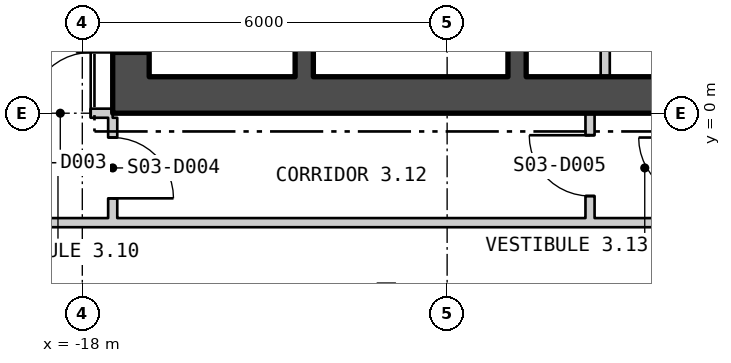
"""IFC4 building model, lengths in metres.
Left out: names, types, materials, properties, quantities, classifications, styles, units other than length and angle.
Written with IfcOpenShell. Run it as: python <this file> out.ifc"""

import sys

from ifc_helpers import new_model, si_unit, direction, frame, frame_2d, origin, origin_2d, place, context, subcontext, project, spatial, polyline, rectangle, i_section, outline, extrude, element, fill, save


model = new_model("IFC4")
c1 = context("Model", 3, precision=1e-05, world=origin(), true_north=direction((0.0, 1.0)))
c2 = subcontext(c1, "Body", "Model", "MODEL_VIEW")
j1 = project(units=[si_unit("LENGTHUNIT", "METRE"), si_unit("PLANEANGLEUNIT", "RADIAN")], contexts=[c1])
p1 = place(None, origin())
s1 = spatial("IfcSite", under=j1, at=p1, CompositionType="ELEMENT")
p2 = place(p1, origin())
s2 = spatial("IfcBuilding", under=s1, at=p2, CompositionType="ELEMENT")
p3 = place(p2, frame((0.0, 0.0, 46.8)))
s3 = spatial("IfcBuildingStorey", under=s2, at=p3, CompositionType="ELEMENT", Elevation=46.8)
p4 = place(p3, frame((-13.0, -3.2, 0.0), z_axis=(0.0, 0.0, 1.0), x_axis=(1.0, 0.0, 0.0)))
e1 = element("IfcColumn", 1, at=p4, inside=s3, PredefinedType="COLUMN", context=c2, shape_type="SweptSolid", body=[
    extrude(i_section(OverallWidth=0.303, OverallDepth=0.814, WebThickness=0.021, FlangeThickness=0.04, at=origin_2d()), origin(), (0.0, 0.0, 1.0), 4.5),
])
p5 = place(p3, frame((-28.445, 10.319, -0.18), z_axis=(0.0, 0.0, 1.0), x_axis=(0.499999764979, -0.866025539474, 0.0)))
e2 = element("IfcWall", 2, at=p5, inside=s3, PredefinedType="SOLIDWALL", context=c2, shape_type="SweptSolid", body=[
    extrude(outline(polyline([(-0.13, -0.225), (45.87, -0.225), (45.61, 0.225), (0.13, 0.225), (-0.13, -0.225)])), origin(), (0.0, 0.0, 1.0), 4.28),
])
p6 = place(p5, frame((1.424, 0.0, 1.08)))
e3 = element("IfcOpeningElement", 3, at=p6, cuts=e2, PredefinedType="OPENING", context=c2, shape_type="SweptSolid", body=[
    extrude(rectangle(XDim=2.4, YDim=2.6, at=frame_2d((1.2, 1.3))), frame((0.0, 0.235, 0.0), z_axis=(0.0, -1.0, 0.0), x_axis=(1.0, 0.0, 0.0)), (0.0, 0.0, 1.0), 0.47),
])
p7 = place(p5, frame((5.893, 0.0, 1.08)))
e4 = element("IfcOpeningElement", 4, at=p7, cuts=e2, PredefinedType="OPENING", context=c2, shape_type="SweptSolid", body=[
    extrude(rectangle(XDim=2.4, YDim=2.6, at=frame_2d((1.2, 1.3))), frame((0.0, 0.235, 0.0), z_axis=(0.0, -1.0, 0.0), x_axis=(1.0, 0.0, 0.0)), (0.0, 0.0, 1.0), 0.47),
])
p8 = place(p5, frame((10.401, 0.0, 1.08)))
e5 = element("IfcOpeningElement", 5, at=p8, cuts=e2, PredefinedType="OPENING", context=c2, shape_type="SweptSolid", body=[
    extrude(rectangle(XDim=2.4, YDim=2.6, at=frame_2d((1.2, 1.3))), frame((0.0, 0.235, 0.0), z_axis=(0.0, -1.0, 0.0), x_axis=(1.0, 0.0, 0.0)), (0.0, 0.0, 1.0), 0.47),
])
p9 = place(p5, frame((14.909, 0.0, 1.08)))
e6 = element("IfcOpeningElement", 6, at=p9, cuts=e2, PredefinedType="OPENING", context=c2, shape_type="SweptSolid", body=[
    extrude(rectangle(XDim=2.4, YDim=2.6, at=frame_2d((1.2, 1.3))), frame((0.0, 0.235, 0.0), z_axis=(0.0, -1.0, 0.0), x_axis=(1.0, 0.0, 0.0)), (0.0, 0.0, 1.0), 0.47),
])
p10 = place(p5, frame((19.416, 0.0, 1.08)))
e7 = element("IfcOpeningElement", 7, at=p10, cuts=e2, PredefinedType="OPENING", context=c2, shape_type="SweptSolid", body=[
    extrude(rectangle(XDim=2.4, YDim=2.6, at=frame_2d((1.2, 1.3))), frame((0.0, 0.235, 0.0), z_axis=(0.0, -1.0, 0.0), x_axis=(1.0, 0.0, 0.0)), (0.0, 0.0, 1.0), 0.47),
])
p11 = place(p5, frame((23.924, 0.0, 1.08)))
e8 = element("IfcOpeningElement", 8, at=p11, cuts=e2, PredefinedType="OPENING", context=c2, shape_type="SweptSolid", body=[
    extrude(rectangle(XDim=2.4, YDim=2.6, at=frame_2d((1.2, 1.3))), frame((0.0, 0.235, 0.0), z_axis=(0.0, -1.0, 0.0), x_axis=(1.0, 0.0, 0.0)), (0.0, 0.0, 1.0), 0.47),
])
p12 = place(p5, frame((28.431, 0.0, 1.08)))
e9 = element("IfcOpeningElement", 9, at=p12, cuts=e2, PredefinedType="OPENING", context=c2, shape_type="SweptSolid", body=[
    extrude(rectangle(XDim=2.4, YDim=2.6, at=frame_2d((1.2, 1.3))), frame((0.0, 0.235, 0.0), z_axis=(0.0, -1.0, 0.0), x_axis=(1.0, 0.0, 0.0)), (0.0, 0.0, 1.0), 0.47),
])
p13 = place(p5, frame((32.939, 0.0, 1.08)))
e10 = element("IfcOpeningElement", 10, at=p13, cuts=e2, PredefinedType="OPENING", context=c2, shape_type="SweptSolid", body=[
    extrude(rectangle(XDim=2.4, YDim=2.6, at=frame_2d((1.2, 1.3))), frame((0.0, 0.235, 0.0), z_axis=(0.0, -1.0, 0.0), x_axis=(1.0, 0.0, 0.0)), (0.0, 0.0, 1.0), 0.47),
])
p14 = place(p5, frame((37.447, 0.0, 1.08)))
e11 = element("IfcOpeningElement", 11, at=p14, cuts=e2, PredefinedType="OPENING", context=c2, shape_type="SweptSolid", body=[
    extrude(rectangle(XDim=2.4, YDim=2.6, at=frame_2d((1.2, 1.3))), frame((0.0, 0.235, 0.0), z_axis=(0.0, -1.0, 0.0), x_axis=(1.0, 0.0, 0.0)), (0.0, 0.0, 1.0), 0.47),
])
p15 = place(p5, frame((41.916, 0.0, 1.08)))
e12 = element("IfcOpeningElement", 12, at=p15, cuts=e2, PredefinedType="OPENING", context=c2, shape_type="SweptSolid", body=[
    extrude(rectangle(XDim=2.4, YDim=2.6, at=frame_2d((1.2, 1.3))), frame((0.0, 0.235, 0.0), z_axis=(0.0, -1.0, 0.0), x_axis=(1.0, 0.0, 0.0)), (0.0, 0.0, 1.0), 0.47),
])
p16 = place(p3, frame((-17.5, 0.3, 0.0), z_axis=(0.0, 0.0, 1.0), x_axis=(1.0, 0.0, 0.0)))
e13 = element("IfcWall", 13, at=p16, inside=s3, PredefinedType="SHEAR", context=c2, shape_type="SweptSolid", body=[
    extrude(rectangle(XDim=35.0, YDim=0.6, at=frame_2d((17.5, 0.0))), origin(), (0.0, 0.0, 1.0), 4.3),
])
p17 = place(p16, frame((12.0, 0.0, 0.0)))
e14 = element("IfcOpeningElement", 14, at=p17, cuts=e13, PredefinedType="OPENING", context=c2, shape_type="SweptSolid", body=[
    extrude(rectangle(XDim=1.8, YDim=2.4, at=frame_2d((0.9, 1.2))), frame((0.0, 0.31, 0.0), z_axis=(0.0, -1.0, 0.0), x_axis=(1.0, 0.0, 0.0)), (0.0, 0.0, 1.0), 0.62),
])
p18 = place(p16, frame((22.0, 0.0, 0.0)))
e15 = element("IfcOpeningElement", 15, at=p18, cuts=e13, PredefinedType="OPENING", context=c2, shape_type="SweptSolid", body=[
    extrude(rectangle(XDim=1.8, YDim=2.4, at=frame_2d((0.9, 1.2))), frame((0.0, 0.31, 0.0), z_axis=(0.0, -1.0, 0.0), x_axis=(1.0, 0.0, 0.0)), (0.0, 0.0, 1.0), 0.62),
])
p19 = place(p3, frame((-17.2, 0.6, 0.0), z_axis=(0.0, 0.0, 1.0), x_axis=(0.0, 1.0, 0.0)))
e16 = element("IfcWall", 16, at=p19, inside=s3, PredefinedType="SHEAR", context=c2, shape_type="SweptSolid", body=[
    extrude(rectangle(XDim=16.8, YDim=0.6, at=frame_2d((8.4, 0.0))), origin(), (0.0, 0.0, 1.0), 4.3),
])
p20 = place(p19, frame((5.7, 0.0, 0.0)))
e17 = element("IfcOpeningElement", 17, at=p20, cuts=e16, PredefinedType="OPENING", context=c2, shape_type="SweptSolid", body=[
    extrude(rectangle(XDim=1.5, YDim=2.1, at=frame_2d((0.75, 1.05))), frame((0.0, 0.31, 0.0), z_axis=(0.0, -1.0, 0.0), x_axis=(1.0, 0.0, 0.0)), (0.0, 0.0, 1.0), 0.62),
])
p21 = place(p19, frame((0.4, 0.0, 0.0)))
e18 = element("IfcOpeningElement", 18, at=p21, cuts=e16, PredefinedType="OPENING", context=c2, shape_type="SweptSolid", body=[
    extrude(rectangle(XDim=0.9, YDim=2.1, at=frame_2d((0.45, 1.05))), frame((0.0, 0.31, 0.0), z_axis=(0.0, -1.0, 0.0), x_axis=(1.0, 0.0, 0.0)), (0.0, 0.0, 1.0), 0.62),
])
p22 = place(p19, frame((3.15, 0.0, 0.0)))
e19 = element("IfcOpeningElement", 19, at=p22, cuts=e16, PredefinedType="OPENING", context=c2, shape_type="SweptSolid", body=[
    extrude(rectangle(XDim=0.9, YDim=2.1, at=frame_2d((0.45, 1.05))), frame((0.0, 0.31, 0.0), z_axis=(0.0, -1.0, 0.0), x_axis=(1.0, 0.0, 0.0)), (0.0, 0.0, 1.0), 0.62),
])
p23 = place(p19, frame((7.816, 0.0, 0.0)))
e20 = element("IfcOpeningElement", 20, at=p23, cuts=e16, PredefinedType="OPENING", context=c2, shape_type="SweptSolid", body=[
    extrude(rectangle(XDim=1.0, YDim=2.1, at=frame_2d((0.5, 1.05))), frame((0.0, 0.31, 0.0), z_axis=(0.0, -1.0, 0.0), x_axis=(1.0, 0.0, 0.0)), (0.0, 0.0, 1.0), 0.62),
])
p24 = place(p19, frame((12.666, 0.0, 0.0)))
e21 = element("IfcOpeningElement", 21, at=p24, cuts=e16, PredefinedType="OPENING", context=c2, shape_type="SweptSolid", body=[
    extrude(rectangle(XDim=0.9, YDim=2.1, at=frame_2d((0.45, 1.05))), frame((0.0, 0.31, 0.0), z_axis=(0.0, -1.0, 0.0), x_axis=(1.0, 0.0, 0.0)), (0.0, 0.0, 1.0), 0.62),
])
p25 = place(p3, frame((-10.85, 0.6, 0.0), z_axis=(0.0, 0.0, 1.0), x_axis=(0.0, 1.0, 0.0)))
e22 = element("IfcWall", 22, at=p25, inside=s3, PredefinedType="SHEAR", context=c2, shape_type="SweptSolid", body=[
    extrude(rectangle(XDim=16.8, YDim=0.3, at=frame_2d((8.4, 0.0))), origin(), (0.0, 0.0, 1.0), 4.3),
])
p26 = place(p25, frame((5.075, 0.0, 0.0)))
e23 = element("IfcOpeningElement", 23, at=p26, cuts=e22, PredefinedType="OPENING", context=c2, shape_type="SweptSolid", body=[
    extrude(rectangle(XDim=1.25, YDim=2.1, at=frame_2d((0.625, 1.05))), frame((0.0, 0.16, 0.0), z_axis=(0.0, -1.0, 0.0), x_axis=(1.0, 0.0, 0.0)), (0.0, 0.0, 1.0), 0.32),
])
p27 = place(p25, frame((1.525, 0.0, 0.0)))
e24 = element("IfcOpeningElement", 24, at=p27, cuts=e22, PredefinedType="OPENING", context=c2, shape_type="SweptSolid", body=[
    extrude(rectangle(XDim=1.0, YDim=2.1, at=frame_2d((0.5, 1.05))), frame((0.0, 0.16, 0.0), z_axis=(0.0, -1.0, 0.0), x_axis=(1.0, 0.0, 0.0)), (0.0, 0.0, 1.0), 0.32),
])
p28 = place(p3, frame((-14.35, 0.6, 0.0), z_axis=(0.0, 0.0, 1.0), x_axis=(0.0, 1.0, 0.0)))
e25 = element("IfcWall", 25, at=p28, inside=s3, PredefinedType="SHEAR", context=c2, shape_type="SweptSolid", body=[
    extrude(rectangle(XDim=16.8, YDim=0.3, at=frame_2d((8.4, 0.0))), origin(), (0.0, 0.0, 1.0), 4.3),
])
p29 = place(p28, frame((5.7, 0.0, 0.0)))
e26 = element("IfcOpeningElement", 26, at=p29, cuts=e25, PredefinedType="OPENING", context=c2, shape_type="SweptSolid", body=[
    extrude(rectangle(XDim=1.5, YDim=2.1, at=frame_2d((0.75, 1.05))), frame((0.0, 0.16, 0.0), z_axis=(0.0, -1.0, 0.0), x_axis=(1.0, 0.0, 0.0)), (0.0, 0.0, 1.0), 0.32),
])
p30 = place(p3, frame((-9.4, 0.6, 0.0), z_axis=(0.0, 0.0, 1.0), x_axis=(0.0, 1.0, 0.0)))
e27 = element("IfcWall", 27, at=p30, inside=s3, PredefinedType="PARTITIONING", context=c2, shape_type="SweptSolid", body=[
    extrude(rectangle(XDim=2.875, YDim=0.15, at=frame_2d((1.438, 0.0))), origin(), (0.0, 0.0, 1.0), 4.3),
])
p31 = place(p3, frame((-19.225, -1.8, 0.0), z_axis=(0.0, 0.0, 1.0), x_axis=(1.0, 0.0, 0.0)))
e28 = element("IfcWall", 28, at=p31, inside=s3, PredefinedType="PARTITIONING", context=c2, shape_type="SweptSolid", body=[
    extrude(rectangle(XDim=11.3, YDim=0.15, at=frame_2d((5.65, 0.0))), origin(), (0.0, 0.0, 1.0), 4.3),
])
p32 = place(p3, frame((-19.225, 0.0, 0.0), z_axis=(0.0, 0.0, 1.0), x_axis=(1.0, 0.0, 0.0)))
e29 = element("IfcWall", 29, at=p32, inside=s3, PredefinedType="PARTITIONING", context=c2, shape_type="SweptSolid", body=[
    extrude(rectangle(XDim=1.725, YDim=0.15, at=frame_2d((0.863, 0.0))), origin(), (0.0, 0.0, 1.0), 3.61),
])
p33 = place(p32, frame((0.363, 0.0, 0.0)))
e30 = element("IfcOpeningElement", 30, at=p33, cuts=e29, PredefinedType="OPENING", context=c2, shape_type="SweptSolid", body=[
    extrude(rectangle(XDim=1.0, YDim=2.1, at=frame_2d((0.5, 1.05))), frame((0.0, 0.085, 0.0), z_axis=(0.0, -1.0, 0.0), x_axis=(1.0, 0.0, 0.0)), (0.0, 0.0, 1.0), 0.17),
])
p34 = place(p3, frame((-17.5, -1.725, 0.0), z_axis=(0.0, 0.0, 1.0), x_axis=(0.0, 1.0, 0.0)))
e31 = element("IfcWall", 31, at=p34, inside=s3, PredefinedType="PARTITIONING", context=c2, shape_type="SweptSolid", body=[
    extrude(rectangle(XDim=1.65, YDim=0.15, at=frame_2d((0.825, 0.0))), origin(), (0.0, 0.0, 1.0), 4.3),
])
p35 = place(p34, frame((0.325, 0.0, 0.0)))
e32 = element("IfcOpeningElement", 32, at=p35, cuts=e31, PredefinedType="OPENING", context=c2, shape_type="SweptSolid", body=[
    extrude(rectangle(XDim=1.0, YDim=2.1, at=frame_2d((0.5, 1.05))), frame((0.0, 0.085, 0.0), z_axis=(0.0, -1.0, 0.0), x_axis=(1.0, 0.0, 0.0)), (0.0, 0.0, 1.0), 0.17),
])
p36 = place(p3, frame((-9.65, -1.725, 0.0), z_axis=(0.0, 0.0, 1.0), x_axis=(0.0, 1.0, 0.0)))
e33 = element("IfcWall", 33, at=p36, inside=s3, PredefinedType="PARTITIONING", context=c2, shape_type="SweptSolid", body=[
    extrude(rectangle(XDim=1.725, YDim=0.15, at=frame_2d((0.863, 0.0))), origin(), (0.0, 0.0, 1.0), 3.7),
])
p37 = place(p36, frame((0.363, 0.0, 0.0)))
e34 = element("IfcOpeningElement", 34, at=p37, cuts=e33, PredefinedType="OPENING", context=c2, shape_type="SweptSolid", body=[
    extrude(rectangle(XDim=1.0, YDim=2.1, at=frame_2d((0.5, 1.05))), frame((0.0, 0.085, 0.0), z_axis=(0.0, -1.0, 0.0), x_axis=(1.0, 0.0, 0.0)), (0.0, 0.0, 1.0), 0.17),
])
p38 = place(p33, origin())
e35 = element("IfcDoor", 35, at=p38, inside=s3, OperationType="SINGLE_SWING_LEFT", PredefinedType="DOOR", context=c2, shape_type="SweptSolid", body=[
    extrude(rectangle(XDim=1.0, YDim=2.1, at=frame_2d((0.5, 1.05))), frame((0.0, 0.025, 0.0), z_axis=(0.0, -1.0, 0.0), x_axis=(1.0, 0.0, 0.0)), (0.0, 0.0, 1.0), 0.05),
])
fill(e30, e35)
p39 = place(p35, origin())
e36 = element("IfcDoor", 36, at=p39, inside=s3, OperationType="SINGLE_SWING_LEFT", PredefinedType="DOOR", context=c2, shape_type="SweptSolid", body=[
    extrude(rectangle(XDim=1.0, YDim=2.1, at=frame_2d((0.5, 1.05))), frame((0.0, 0.025, 0.0), z_axis=(0.0, -1.0, 0.0), x_axis=(1.0, 0.0, 0.0)), (0.0, 0.0, 1.0), 0.05),
])
fill(e32, e36)
p40 = place(p37, origin())
e37 = element("IfcDoor", 37, at=p40, inside=s3, OperationType="SINGLE_SWING_LEFT", PredefinedType="DOOR", context=c2, shape_type="SweptSolid", body=[
    extrude(rectangle(XDim=1.0, YDim=2.1, at=frame_2d((0.5, 1.05))), frame((0.0, 0.025, 0.0), z_axis=(0.0, -1.0, 0.0), x_axis=(1.0, 0.0, 0.0)), (0.0, 0.0, 1.0), 0.05),
])
fill(e34, e37)
save(model, sys.argv[1])
